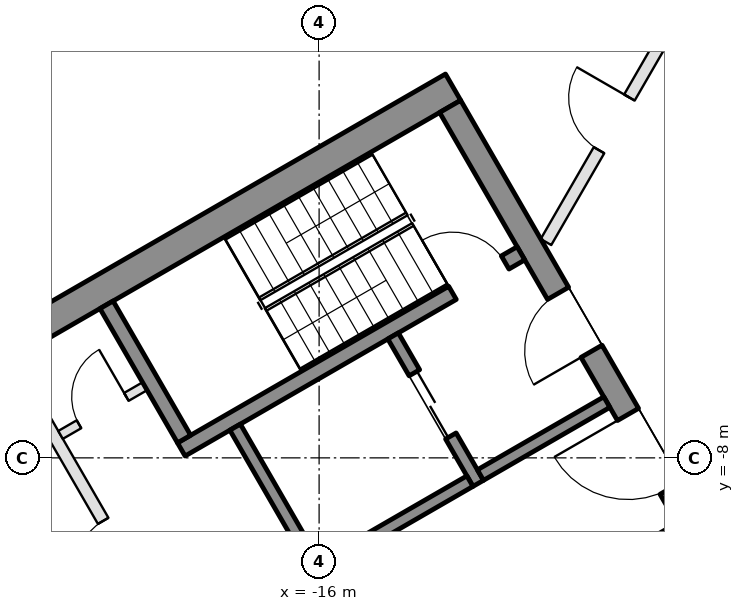
"""IFC4 building model, lengths in metres.
Left out: names, types, materials, properties, quantities, classifications, styles, units other than length and angle.
Written with IfcOpenShell. Run it as: python <this file> out.ifc"""

import sys

from ifc_helpers import new_model, si_unit, direction, frame, frame_2d, origin, place, context, subcontext, project, spatial, rectangle, extrude, element, fill, save


model = new_model("IFC4")
c1 = context("Model", 3, precision=1e-05, world=origin(), true_north=direction((0.0, 1.0)))
c2 = subcontext(c1, "Body", "Model", "MODEL_VIEW")
j1 = project(units=[si_unit("LENGTHUNIT", "METRE"), si_unit("PLANEANGLEUNIT", "RADIAN")], contexts=[c1])
p1 = place(None, origin())
s1 = spatial("IfcSite", under=j1, at=p1, CompositionType="ELEMENT")
p2 = place(p1, origin())
s2 = spatial("IfcBuilding", under=s1, at=p2, CompositionType="ELEMENT")
p3 = place(p2, frame((0.0, 0.0, 146.6)))
s3 = spatial("IfcBuildingStorey", under=s2, at=p3, CompositionType="ELEMENT", Elevation=146.6)
p4 = place(p3, frame((-20.309, 1.934, 0.0), z_axis=(0.0, 0.0, 1.0), x_axis=(-0.499992114976, -0.866029956157, 0.0)))
e1 = element("IfcWall", 1, at=p4, inside=s3, PredefinedType="SOLIDWALL", context=c2, shape_type="SweptSolid", body=[
    extrude(rectangle(XDim=6.74, YDim=0.35, at=frame_2d((3.37, 0.0))), origin(), (0.0, 0.0, 1.0), 3.55),
])
p5 = place(p4, frame((0.77, 0.0, 0.0)))
e2 = element("IfcOpeningElement", 2, at=p5, cuts=e1, PredefinedType="OPENING", context=c2, shape_type="SweptSolid", body=[
    extrude(rectangle(XDim=2.4, YDim=2.4, at=frame_2d((1.2, 1.2))), frame((0.0, 0.185, 0.0), z_axis=(0.0, -1.0, 0.0), x_axis=(1.0, 0.0, 0.0)), (0.0, 0.0, 1.0), 0.37),
])
p6 = place(p4, frame((3.47, 0.0, 0.3)))
e3 = element("IfcOpeningElement", 3, at=p6, cuts=e1, PredefinedType="OPENING", context=c2, shape_type="SweptSolid", body=[
    extrude(rectangle(XDim=2.9, YDim=2.65, at=frame_2d((1.45, 1.325))), frame((0.0, 0.185, 0.0), z_axis=(0.0, -1.0, 0.0), x_axis=(1.0, 0.0, 0.0)), (0.0, 0.0, 1.0), 0.37),
])
p7 = place(p3, frame((-13.797, -1.903, 0.0), z_axis=(0.0, 0.0, 1.0), x_axis=(-0.866025009528, -0.500000682871, 0.0)))
e4 = element("IfcWall", 4, at=p7, inside=s3, PredefinedType="SHEAR", context=c2, shape_type="SweptSolid", body=[
    extrude(rectangle(XDim=14.837, YDim=0.5, at=frame_2d((7.418, 0.0))), origin(), (0.0, 0.0, 1.0), 3.5),
])
p8 = place(p3, frame((-13.845, -2.22, 0.0), z_axis=(0.0, 0.0, 1.0), x_axis=(0.500004234368, -0.866022959057, 0.0)))
e5 = element("IfcWall", 5, at=p8, inside=s3, PredefinedType="SHEAR", context=c2, shape_type="SweptSolid", body=[
    extrude(rectangle(XDim=10.0, YDim=0.4, at=frame_2d((5.0, 0.0))), origin(), (0.0, 0.0, 1.0), 3.5),
])
p9 = place(p8, frame((3.55, 0.0, 0.0)))
e6 = element("IfcOpeningElement", 6, at=p9, cuts=e5, PredefinedType="OPENING", context=c2, shape_type="SweptSolid", body=[
    extrude(rectangle(XDim=1.1, YDim=2.1, at=frame_2d((0.55, 1.05))), frame((0.0, 0.21, 0.0), z_axis=(0.0, -1.0, 0.0), x_axis=(1.0, 0.0, 0.0)), (0.0, 0.0, 1.0), 0.42),
])
p10 = place(p8, frame((5.85, 0.0, 0.0)))
e7 = element("IfcOpeningElement", 7, at=p10, cuts=e5, PredefinedType="OPENING", context=c2, shape_type="SweptSolid", body=[
    extrude(rectangle(XDim=1.4, YDim=2.1, at=frame_2d((0.7, 1.05))), frame((0.0, 0.21, 0.0), z_axis=(0.0, -1.0, 0.0), x_axis=(1.0, 0.0, 0.0)), (0.0, 0.0, 1.0), 0.42),
])
p11 = place(p3, frame((-12.681, -4.636, 0.0), z_axis=(0.0, 0.0, 1.0), x_axis=(-0.866021702275, -0.500006411147, 0.0)))
e8 = element("IfcWall", 8, at=p11, inside=s3, PredefinedType="SHEAR", context=c2, shape_type="SweptSolid", body=[
    extrude(rectangle(XDim=6.45, YDim=0.25, at=frame_2d((3.225, 0.0))), origin(), (0.0, 0.0, 1.0), 3.5),
])
p12 = place(p11, frame((0.3, 0.0, 0.0)))
e9 = element("IfcOpeningElement", 9, at=p12, cuts=e8, PredefinedType="OPENING", context=c2, shape_type="SweptSolid", body=[
    extrude(rectangle(XDim=1.0, YDim=2.1, at=frame_2d((0.5, 1.05))), frame((0.0, 0.135, 0.0), z_axis=(0.0, -1.0, 0.0), x_axis=(1.0, 0.0, 0.0)), (0.0, 0.0, 1.0), 0.27),
])
p13 = place(p3, frame((-19.496, -5.482, 0.0), z_axis=(0.0, 0.0, 1.0), x_axis=(0.499990435942, -0.866030925526, 0.0)))
e10 = element("IfcWall", 10, at=p13, inside=s3, PredefinedType="SHEAR", context=c2, shape_type="SweptSolid", body=[
    extrude(rectangle(XDim=2.55, YDim=0.25, at=frame_2d((1.275, 0.0))), origin(), (0.0, 0.0, 1.0), 3.5),
])
p14 = place(p3, frame((-17.381, -7.495, 0.0), z_axis=(0.0, 0.0, 1.0), x_axis=(0.500011755427, -0.866018616679, 0.0)))
e11 = element("IfcWall", 11, at=p14, inside=s3, PredefinedType="SHEAR", context=c2, shape_type="SweptSolid", body=[
    extrude(rectangle(XDim=2.8, YDim=0.2, at=frame_2d((1.4, 0.0))), origin(), (0.0, 0.0, 1.0), 3.5),
])
p15 = place(p3, frame((-14.783, -5.995, 0.0), z_axis=(0.0, 0.0, 1.0), x_axis=(0.49994636267, -0.866056369097, 0.0)))
e12 = element("IfcWall", 12, at=p15, inside=s3, PredefinedType="SHEAR", context=c2, shape_type="SweptSolid", body=[
    extrude(rectangle(XDim=2.8, YDim=0.2, at=frame_2d((1.4, 0.0))), origin(), (0.0, 0.0, 1.0), 3.5),
])
p16 = place(p15, frame((0.7, 0.0, 0.0)))
e13 = element("IfcOpeningElement", 13, at=p16, cuts=e12, PredefinedType="OPENING", context=c2, shape_type="SweptSolid", body=[
    extrude(rectangle(XDim=1.2, YDim=2.1, at=frame_2d((0.6, 1.05))), frame((0.0, 0.11, 0.0), z_axis=(0.0, -1.0, 0.0), x_axis=(1.0, 0.0, 0.0)), (0.0, 0.0, 1.0), 0.22),
])
p17 = place(p3, frame((-13.52, -8.383, 0.0), z_axis=(0.0, 0.0, 1.0), x_axis=(-0.866034573852, -0.49998411664, 0.0)))
e14 = element("IfcWall", 14, at=p17, inside=s3, PredefinedType="SHEAR", context=c2, shape_type="SweptSolid", body=[
    extrude(rectangle(XDim=2.8, YDim=0.2, at=frame_2d((1.4, 0.0))), origin(), (0.0, 0.0, 1.0), 3.5),
])
p18 = place(p3, frame((-11.268, -7.083, 0.0), z_axis=(0.0, 0.0, 1.0), x_axis=(-0.866050077142, -0.499957262057, 0.0)))
e15 = element("IfcWall", 15, at=p18, inside=s3, PredefinedType="SHEAR", context=c2, shape_type="SweptSolid", body=[
    extrude(rectangle(XDim=2.4, YDim=0.2, at=frame_2d((1.2, 0.0))), origin(), (0.0, 0.0, 1.0), 3.5),
])
p19 = place(p3, frame((-10.068, -9.162, 0.0), z_axis=(0.0, 0.0, 1.0), x_axis=(-0.866032725843, -0.499987317609, 0.0)))
e16 = element("IfcWall", 16, at=p19, inside=s3, PredefinedType="SHEAR", context=c2, shape_type="SweptSolid", body=[
    extrude(rectangle(XDim=10.16, YDim=0.2, at=frame_2d((5.08, 0.0))), origin(), (0.0, 0.0, 1.0), 3.5),
])
p20 = place(p19, frame((0.62, 0.0, 0.0)))
e17 = element("IfcOpeningElement", 17, at=p20, cuts=e16, PredefinedType="OPENING", context=c2, shape_type="SweptSolid", body=[
    extrude(rectangle(XDim=1.1, YDim=2.1, at=frame_2d((0.55, 1.05))), frame((0.0, 0.11, 0.0), z_axis=(0.0, -1.0, 0.0), x_axis=(1.0, 0.0, 0.0)), (0.0, 0.0, 1.0), 0.22),
])
p21 = place(p19, frame((3.16, 0.0, 0.0)))
e18 = element("IfcOpeningElement", 18, at=p21, cuts=e16, PredefinedType="OPENING", context=c2, shape_type="SweptSolid", body=[
    extrude(rectangle(XDim=1.1, YDim=2.1, at=frame_2d((0.55, 1.05))), frame((0.0, 0.11, 0.0), z_axis=(0.0, -1.0, 0.0), x_axis=(1.0, 0.0, 0.0)), (0.0, 0.0, 1.0), 0.22),
])
p22 = place(p19, frame((5.7, 0.0, 0.0)))
e19 = element("IfcOpeningElement", 19, at=p22, cuts=e16, PredefinedType="OPENING", context=c2, shape_type="SweptSolid", body=[
    extrude(rectangle(XDim=1.1, YDim=2.1, at=frame_2d((0.55, 1.05))), frame((0.0, 0.11, 0.0), z_axis=(0.0, -1.0, 0.0), x_axis=(1.0, 0.0, 0.0)), (0.0, 0.0, 1.0), 0.22),
])
p23 = place(p19, frame((8.24, 0.0, 0.0)))
e20 = element("IfcOpeningElement", 20, at=p23, cuts=e16, PredefinedType="OPENING", context=c2, shape_type="SweptSolid", body=[
    extrude(rectangle(XDim=1.1, YDim=2.1, at=frame_2d((0.55, 1.05))), frame((0.0, 0.11, 0.0), z_axis=(0.0, -1.0, 0.0), x_axis=(1.0, 0.0, 0.0)), (0.0, 0.0, 1.0), 0.22),
])
p24 = place(p3, frame((-21.076, -6.395, 0.0), z_axis=(0.0, 0.0, 1.0), x_axis=(0.50001468107, -0.866016927499, 0.0)))
e21 = element("IfcWall", 21, at=p24, inside=s3, PredefinedType="PARTITIONING", context=c2, shape_type="SweptSolid", body=[
    extrude(rectangle(XDim=5.4, YDim=0.2, at=frame_2d((2.7, 0.0))), origin(), (0.0, 0.0, 1.0), 3.5),
])
p25 = place(p24, frame((3.05, 0.0, 0.0)))
e22 = element("IfcOpeningElement", 22, at=p25, cuts=e21, PredefinedType="OPENING", context=c2, shape_type="SweptSolid", body=[
    extrude(rectangle(XDim=0.9, YDim=2.1, at=frame_2d((0.45, 1.05))), frame((0.0, 0.11, 0.0), z_axis=(0.0, -1.0, 0.0), x_axis=(1.0, 0.0, 0.0)), (0.0, 0.0, 1.0), 0.22),
])
p26 = place(p3, frame((-18.866, -6.822, 0.0), z_axis=(0.0, 0.0, 1.0), x_axis=(-0.866028054938, -0.499995408039, 0.0)))
e23 = element("IfcWall", 23, at=p26, inside=s3, PredefinedType="PARTITIONING", context=c2, shape_type="SweptSolid", body=[
    extrude(rectangle(XDim=1.6, YDim=0.15, at=frame_2d((0.8, 0.0))), origin(), (0.0, 0.0, 1.0), 3.5),
])
p27 = place(p26, frame((0.35, 0.0, 0.0)))
e24 = element("IfcOpeningElement", 24, at=p27, cuts=e23, PredefinedType="OPENING", context=c2, shape_type="SweptSolid", body=[
    extrude(rectangle(XDim=0.9, YDim=2.1, at=frame_2d((0.45, 1.05))), frame((0.0, 0.085, 0.0), z_axis=(0.0, -1.0, 0.0), x_axis=(1.0, 0.0, 0.0)), (0.0, 0.0, 1.0), 0.17),
])
p28 = place(p3, frame((-12.269, -4.45, 0.0), z_axis=(0.0, 0.0, 1.0), x_axis=(0.500000259638, 0.866025253883, 0.0)))
e25 = element("IfcWall", 25, at=p28, inside=s3, PredefinedType="PARTITIONING", context=c2, shape_type="SweptSolid", body=[
    extrude(rectangle(XDim=4.488, YDim=0.2, at=frame_2d((2.244, 0.0))), origin(), (0.0, 0.0, 1.0), 2.95),
])
p29 = place(p28, frame((1.744, 0.0, 0.0)))
e26 = element("IfcOpeningElement", 26, at=p29, cuts=e25, PredefinedType="OPENING", context=c2, shape_type="SweptSolid", body=[
    extrude(rectangle(XDim=1.0, YDim=2.1, at=frame_2d((0.5, 1.05))), frame((0.0, 0.11, 0.0), z_axis=(0.0, -1.0, 0.0), x_axis=(1.0, 0.0, 0.0)), (0.0, 0.0, 1.0), 0.22),
])
p30 = place(p16, origin())
e27 = element("IfcDoor", 27, at=p30, inside=s3, OperationType="DOUBLE_DOOR_SLIDING", PredefinedType="DOOR", context=c2, shape_type="SweptSolid", body=[
    extrude(rectangle(XDim=1.2, YDim=2.1, at=frame_2d((0.6, 1.05))), frame((0.0, 0.025, 0.0), z_axis=(0.0, -1.0, 0.0), x_axis=(1.0, 0.0, 0.0)), (0.0, 0.0, 1.0), 0.05),
])
fill(e13, e27)
p31 = place(p27, frame((0.9, 0.0, 0.0), z_axis=(0.0, 0.0, 1.0), x_axis=(-1.0, 0.0, 0.0)))
e28 = element("IfcDoor", 28, at=p31, inside=s3, OperationType="SINGLE_SWING_RIGHT", PredefinedType="DOOR", context=c2, shape_type="SweptSolid", body=[
    extrude(rectangle(XDim=0.9, YDim=2.1, at=frame_2d((0.45, 1.05))), frame((0.0, 0.025, 0.0), z_axis=(0.0, -1.0, 0.0), x_axis=(1.0, 0.0, 0.0)), (0.0, 0.0, 1.0), 0.05),
])
fill(e24, e28)
p32 = place(p25, frame((0.9, 0.0, 0.0), z_axis=(0.0, 0.0, 1.0), x_axis=(-1.0, 0.0, 0.0)))
e29 = element("IfcDoor", 29, at=p32, inside=s3, OperationType="SINGLE_SWING_LEFT", PredefinedType="DOOR", context=c2, shape_type="SweptSolid", body=[
    extrude(rectangle(XDim=0.9, YDim=2.1, at=frame_2d((0.45, 1.05))), frame((0.0, 0.025, 0.0), z_axis=(0.0, -1.0, 0.0), x_axis=(1.0, 0.0, 0.0)), (0.0, 0.0, 1.0), 0.05),
])
fill(e22, e29)
p33 = place(p9, frame((1.1, 0.0, 0.0), z_axis=(0.0, 0.0, 1.0), x_axis=(-1.0, 0.0, 0.0)))
e30 = element("IfcDoor", 30, at=p33, inside=s3, OperationType="SINGLE_SWING_LEFT", PredefinedType="DOOR", context=c2, shape_type="SweptSolid", body=[
    extrude(rectangle(XDim=1.1, YDim=2.1, at=frame_2d((0.55, 1.05))), frame((0.0, 0.025, 0.0), z_axis=(0.0, -1.0, 0.0), x_axis=(1.0, 0.0, 0.0)), (0.0, 0.0, 1.0), 0.05),
])
fill(e6, e30)
p34 = place(p10, frame((1.4, 0.0, 0.0), z_axis=(0.0, 0.0, 1.0), x_axis=(-1.0, 0.0, 0.0)))
e31 = element("IfcDoor", 31, at=p34, inside=s3, OperationType="DOUBLE_DOOR_SINGLE_SWING", PredefinedType="DOOR", context=c2, shape_type="SweptSolid", body=[
    extrude(rectangle(XDim=1.4, YDim=2.1, at=frame_2d((0.7, 1.05))), frame((0.0, 0.025, 0.0), z_axis=(0.0, -1.0, 0.0), x_axis=(1.0, 0.0, 0.0)), (0.0, 0.0, 1.0), 0.05),
])
fill(e7, e31)
p35 = place(p12, frame((1.0, 0.0, 0.0), z_axis=(0.0, 0.0, 1.0), x_axis=(-1.0, 0.0, 0.0)))
e32 = element("IfcDoor", 32, at=p35, inside=s3, OperationType="SINGLE_SWING_LEFT", PredefinedType="DOOR", context=c2, shape_type="SweptSolid", body=[
    extrude(rectangle(XDim=1.0, YDim=2.1, at=frame_2d((0.5, 1.05))), frame((0.0, 0.025, 0.0), z_axis=(0.0, -1.0, 0.0), x_axis=(1.0, 0.0, 0.0)), (0.0, 0.0, 1.0), 0.05),
])
fill(e9, e32)
p36 = place(p29, origin())
e33 = element("IfcDoor", 33, at=p36, inside=s3, OperationType="SINGLE_SWING_RIGHT", PredefinedType="DOOR", context=c2, shape_type="SweptSolid", body=[
    extrude(rectangle(XDim=1.0, YDim=2.1, at=frame_2d((0.5, 1.05))), frame((0.0, 0.025, 0.0), z_axis=(0.0, -1.0, 0.0), x_axis=(1.0, 0.0, 0.0)), (0.0, 0.0, 1.0), 0.05),
])
fill(e26, e33)
save(model, sys.argv[1])
